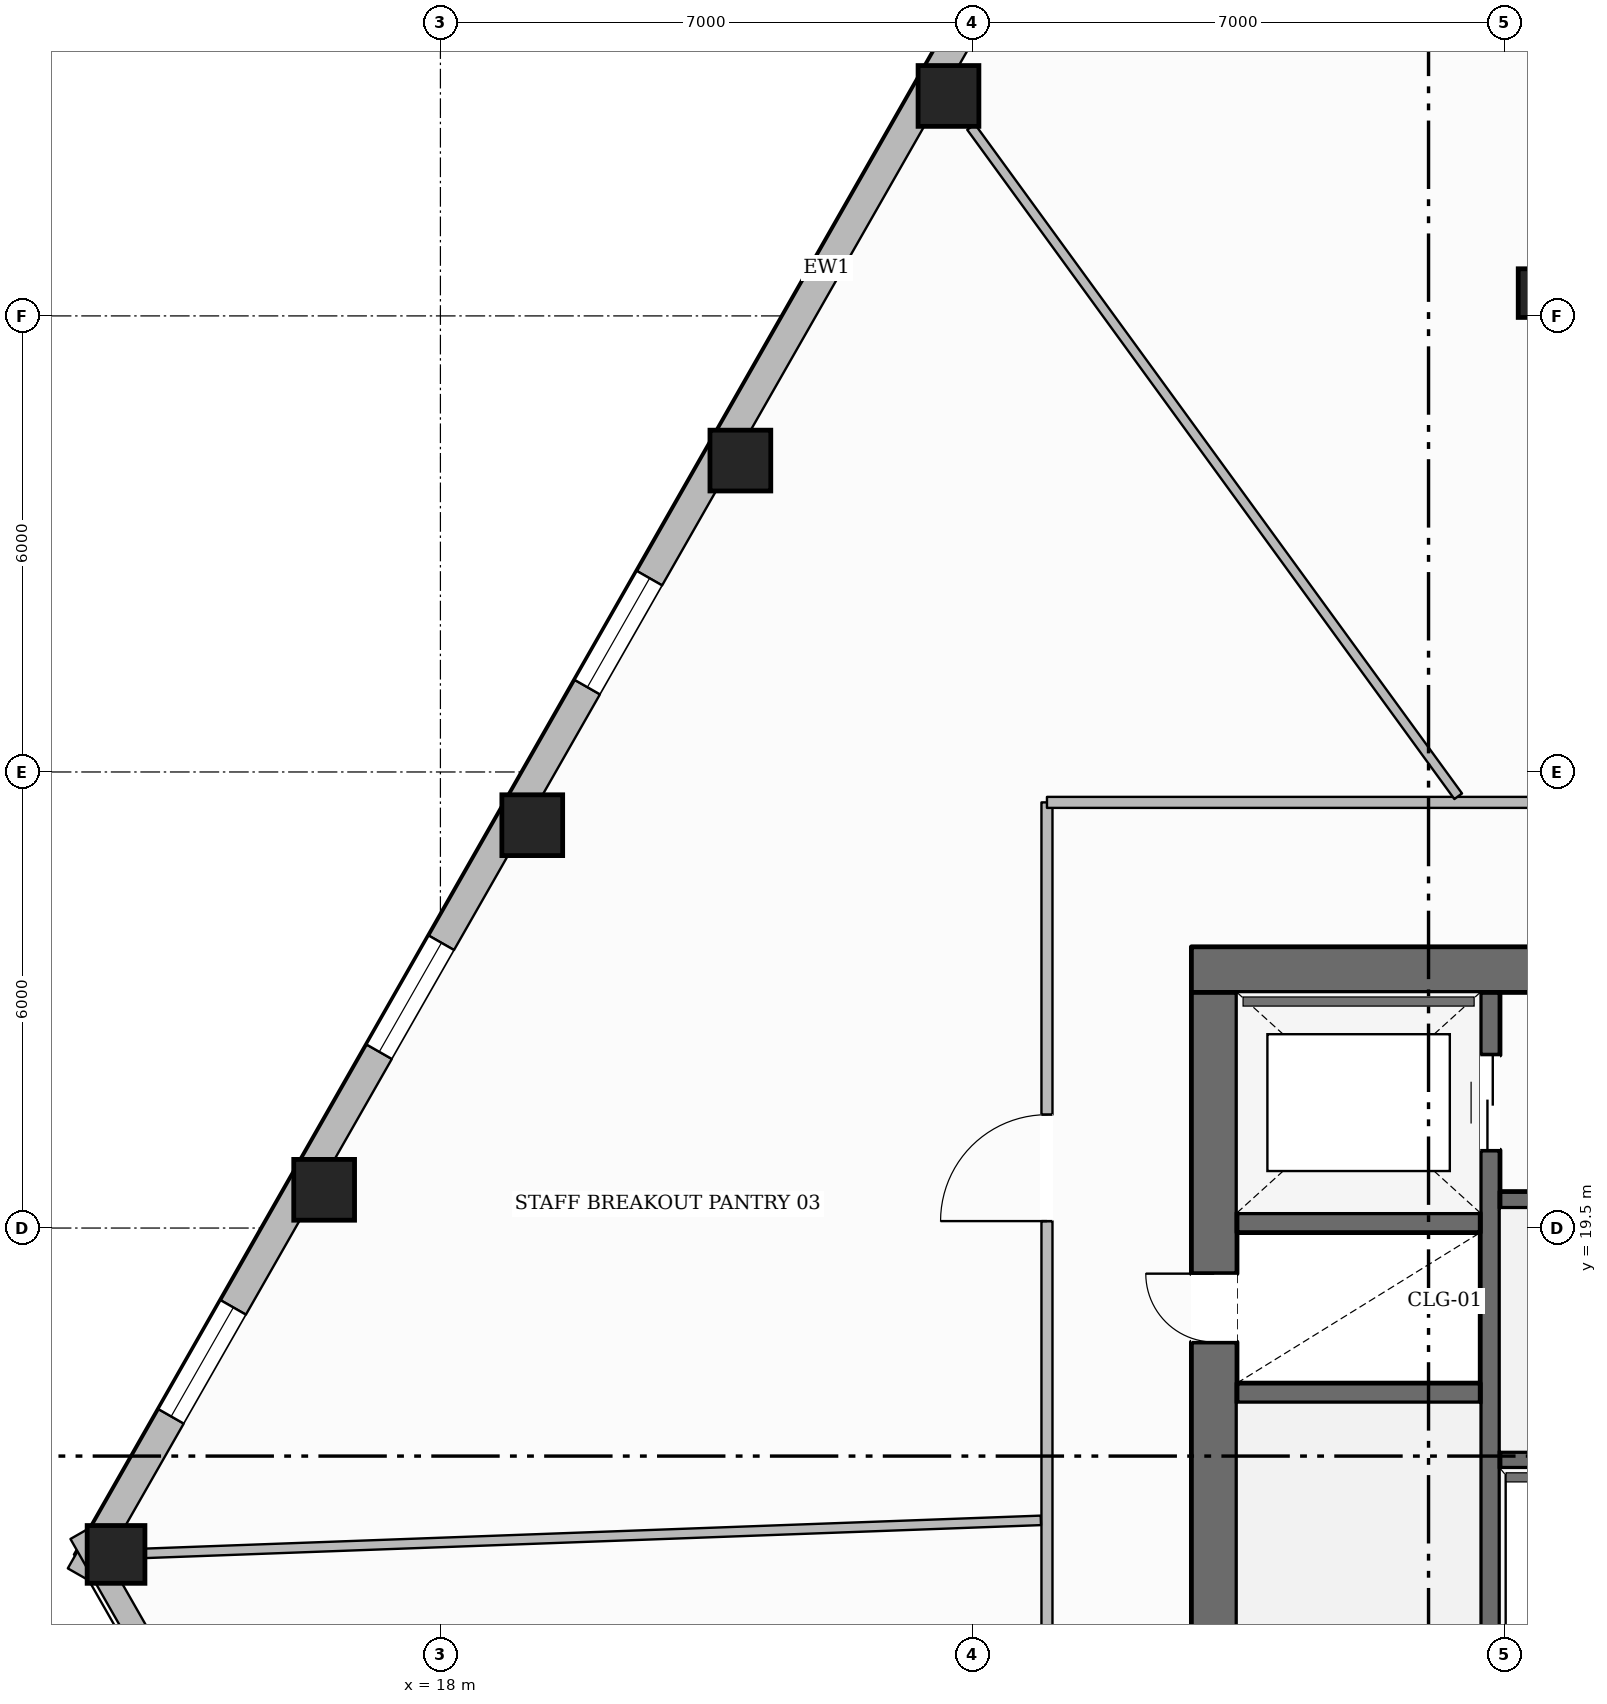
"""IFC4 building model, lengths in metres.
Left out: names, types, materials, properties, quantities, classifications, styles, units other than length and angle.
Written with IfcOpenShell. Run it as: python <this file> out.ifc"""

import sys

from ifc_helpers import new_model, si_unit, direction, frame, frame_2d, origin, origin_2d, place, context, subcontext, project, spatial, rectangle, hollow_rectangle, extrude, element, fill, save


model = new_model("IFC4")
c1 = context("Model", 3, precision=1e-05, world=origin(), true_north=direction((0.0, 1.0)))
c2 = subcontext(c1, "Body", "Model", "MODEL_VIEW")
j1 = project(units=[si_unit("LENGTHUNIT", "METRE"), si_unit("PLANEANGLEUNIT", "RADIAN")], contexts=[c1])
p1 = place(None, origin())
s1 = spatial("IfcSite", under=j1, at=p1, CompositionType="ELEMENT")
p2 = place(p1, origin())
s2 = spatial("IfcBuilding", under=s1, at=p2, CompositionType="ELEMENT")
p3 = place(p2, frame((0.0, 0.0, 21.4)))
s3 = spatial("IfcBuildingStorey", under=s2, at=p3, CompositionType="ELEMENT", Elevation=21.4)
p4 = place(p3, frame((27.88, 22.9, 0.0), z_axis=(0.0, 0.0, 1.0), x_axis=(1.0, 0.0, 0.0)))
e1 = element("IfcWall", 1, at=p4, inside=s3, PredefinedType="SOLIDWALL", context=c2, shape_type="SweptSolid", body=[
    extrude(rectangle(XDim=20.24, YDim=0.6, at=frame_2d((10.12, 0.0))), origin(), (0.0, 0.0, 1.0), 3.59),
])
p5 = place(p4, frame((6.395, 0.0, 0.0)))
e2 = element("IfcOpeningElement", 2, at=p5, cuts=e1, PredefinedType="OPENING", context=c2, shape_type="SweptSolid", body=[
    extrude(rectangle(XDim=1.05, YDim=2.15, at=frame_2d((0.525, 1.075))), frame((0.0, 0.31, 0.0), z_axis=(0.0, -1.0, 0.0), x_axis=(1.0, 0.0, 0.0)), (0.0, 0.0, 1.0), 0.62),
])
p6 = place(p4, frame((12.795, 0.0, 0.0)))
e3 = element("IfcOpeningElement", 3, at=p6, cuts=e1, PredefinedType="OPENING", context=c2, shape_type="SweptSolid", body=[
    extrude(rectangle(XDim=1.05, YDim=2.15, at=frame_2d((0.525, 1.075))), frame((0.0, 0.31, 0.0), z_axis=(0.0, -1.0, 0.0), x_axis=(1.0, 0.0, 0.0)), (0.0, 0.0, 1.0), 0.62),
])
p7 = place(p3, frame((28.18, 9.6, 0.0), z_axis=(0.0, 0.0, 1.0), x_axis=(0.0, 1.0, 0.0)))
e4 = element("IfcWall", 4, at=p7, inside=s3, PredefinedType="SOLIDWALL", context=c2, shape_type="SweptSolid", body=[
    extrude(rectangle(XDim=13.0, YDim=0.6, at=frame_2d((6.5, 0.0))), origin(), (0.0, 0.0, 1.0), 3.59),
])
p8 = place(p7, frame((0.2, 0.0, 0.0)))
e5 = element("IfcOpeningElement", 5, at=p8, cuts=e4, PredefinedType="OPENING", context=c2, shape_type="SweptSolid", body=[
    extrude(rectangle(XDim=1.1, YDim=2.15, at=frame_2d((0.55, 1.075))), frame((0.0, 0.31, 0.0), z_axis=(0.0, -1.0, 0.0), x_axis=(1.0, 0.0, 0.0)), (0.0, 0.0, 1.0), 0.62),
])
p9 = place(p7, frame((8.4, 0.0, 0.0)))
e6 = element("IfcOpeningElement", 6, at=p9, cuts=e4, PredefinedType="OPENING", context=c2, shape_type="SweptSolid", body=[
    extrude(rectangle(XDim=0.9, YDim=2.1, at=frame_2d((0.45, 1.05))), frame((0.0, 0.31, 0.0), z_axis=(0.0, -1.0, 0.0), x_axis=(1.0, 0.0, 0.0)), (0.0, 0.0, 1.0), 0.62),
])
p10 = place(p3, frame((31.81, 9.6, 0.0), z_axis=(0.0, 0.0, 1.0), x_axis=(0.0, 1.0, 0.0)))
e7 = element("IfcWall", 7, at=p10, inside=s3, PredefinedType="SHEAR", context=c2, shape_type="SweptSolid", body=[
    extrude(rectangle(XDim=13.0, YDim=0.26, at=frame_2d((6.5, 0.0))), origin(), (0.0, 0.0, 1.0), 3.59),
])
p11 = place(p10, frame((10.925, 0.0, 0.0)))
e8 = element("IfcOpeningElement", 8, at=p11, cuts=e7, PredefinedType="OPENING", context=c2, shape_type="SweptSolid", body=[
    extrude(rectangle(XDim=1.25, YDim=2.25, at=frame_2d((0.625, 1.125))), frame((0.0, 0.14, 0.0), z_axis=(0.0, -1.0, 0.0), x_axis=(1.0, 0.0, 0.0)), (0.0, 0.0, 1.0), 0.28),
])
for number, where, z_axis, x_axis in (
    (9, (28.48, 17.33, 0.0), (0.0, 0.0, 1.0), (1.0, 0.0, 0.0)),
    (10, (28.48, 19.57, 0.0), (0.0, 0.0, 1.0), (1.0, 0.0, 0.0)),
):
    element("IfcWall", number, at=place(p3, frame(where, z_axis=z_axis, x_axis=x_axis)), inside=s3, PredefinedType="SHEAR", context=c2, shape_type="SweptSolid", body=[
        extrude(rectangle(XDim=3.2, YDim=0.26, at=frame_2d((1.6, 0.0))), origin(), (0.0, 0.0, 1.0), 3.59),
    ])
p12 = place(p3, frame((31.94, 19.87, 0.0), z_axis=(0.0, 0.0, 1.0), x_axis=(1.0, 0.0, 0.0)))
e11 = element("IfcWall", 11, at=p12, inside=s3, PredefinedType="SOLIDWALL", context=c2, shape_type="SweptSolid", body=[
    extrude(rectangle(XDim=12.12, YDim=0.22, at=frame_2d((6.06, 0.0))), origin(), (0.0, 0.0, 1.0), 3.59),
])
p13 = place(p12, frame((6.3, 0.0, 0.0)))
e12 = element("IfcOpeningElement", 12, at=p13, cuts=e11, PredefinedType="OPENING", context=c2, shape_type="SweptSolid", body=[
    extrude(rectangle(XDim=1.1, YDim=2.15, at=frame_2d((0.55, 1.075))), frame((0.0, 0.12, 0.0), z_axis=(0.0, -1.0, 0.0), x_axis=(1.0, 0.0, 0.0)), (0.0, 0.0, 1.0), 0.24),
])
p14 = place(p12, frame((9.51, 0.0, 0.0)))
e13 = element("IfcOpeningElement", 13, at=p14, cuts=e11, PredefinedType="OPENING", context=c2, shape_type="SweptSolid", body=[
    extrude(rectangle(XDim=0.9, YDim=2.1, at=frame_2d((0.45, 1.05))), frame((0.0, 0.12, 0.0), z_axis=(0.0, -1.0, 0.0), x_axis=(1.0, 0.0, 0.0)), (0.0, 0.0, 1.0), 0.24),
])
p15 = place(p3, frame((31.94, 16.45, 0.0), z_axis=(0.0, 0.0, 1.0), x_axis=(1.0, 0.0, 0.0)))
e14 = element("IfcWall", 14, at=p15, inside=s3, PredefinedType="SOLIDWALL", context=c2, shape_type="SweptSolid", body=[
    extrude(rectangle(XDim=12.12, YDim=0.22, at=frame_2d((6.06, 0.0))), origin(), (0.0, 0.0, 1.0), 3.59),
])
for number, where, z_axis, x_axis in (
    (15, (24.684, 34.394, 0.0), (0.0, 0.0, 1.0), (1.0, 0.0, 0.0)),
    (16, (21.946, 29.597, 0.0), (0.0, 0.0, 1.0), (1.0, 0.0, 0.0)),
    (17, (19.208, 24.8, 0.0), (0.0, 0.0, 1.0), (1.0, 0.0, 0.0)),
    (18, (16.47, 20.003, 0.0), (0.0, 0.0, 1.0), (1.0, 0.0, 0.0)),
):
    element("IfcColumn", number, at=place(p3, frame(where, z_axis=z_axis, x_axis=x_axis)), inside=s3, PredefinedType="COLUMN", context=c2, shape_type="SweptSolid", body=[
        extrude(hollow_rectangle(XDim=0.8, YDim=0.8, WallThickness=0.036, at=origin_2d()), origin(), (0.0, 0.0, 1.0), 3.59),
    ])
p16 = place(p3, frame((13.733, 15.206, 0.0), z_axis=(0.0, 0.0, 1.0), x_axis=(1.0, 0.0, 0.0)))
e19 = element("IfcColumn", 19, at=p16, inside=s3, PredefinedType="COLUMN", context=c2, shape_type="SweptSolid", body=[
    extrude(hollow_rectangle(XDim=0.76, YDim=0.76, WallThickness=0.035, at=origin_2d()), origin(), (0.0, 0.0, 1.0), 3.59),
])
p17 = place(p3, frame((32.5, 31.8, 0.0), z_axis=(0.0, 0.0, 1.0), x_axis=(1.0, 0.0, 0.0)))
e20 = element("IfcColumn", 20, at=p17, inside=s3, PredefinedType="COLUMN", context=c2, shape_type="SweptSolid", body=[
    extrude(hollow_rectangle(XDim=0.64, YDim=0.64, WallThickness=0.028, at=origin_2d()), origin(), (0.0, 0.0, 1.0), 3.59),
])
p18 = place(p3, frame((13.263, 14.928, 0.0), z_axis=(0.0, 0.0, 1.0), x_axis=(0.495711630902, 0.868487178367, 0.0)))
e21 = element("IfcWall", 21, at=p18, inside=s3, PredefinedType="STANDARD", context=c2, shape_type="SweptSolid", body=[
    extrude(rectangle(XDim=34.092, YDim=0.38, at=frame_2d((17.046, 0.0))), origin(), (0.0, 0.0, 1.0), 2.97),
])
p19 = place(p18, frame((30.027, 0.0, 0.65)))
e22 = element("IfcOpeningElement", 22, at=p19, cuts=e21, PredefinedType="OPENING", context=c2, shape_type="SweptSolid", body=[
    extrude(rectangle(XDim=1.65, YDim=1.75, at=frame_2d((0.825, 0.875))), frame((0.0, 0.2, 0.0), z_axis=(0.0, -1.0, 0.0), x_axis=(1.0, 0.0, 0.0)), (0.0, 0.0, 1.0), 0.4),
])
p20 = place(p18, frame((24.504, 0.0, 0.65)))
e23 = element("IfcOpeningElement", 23, at=p20, cuts=e21, PredefinedType="OPENING", context=c2, shape_type="SweptSolid", body=[
    extrude(rectangle(XDim=1.65, YDim=1.75, at=frame_2d((0.825, 0.875))), frame((0.0, 0.2, 0.0), z_axis=(0.0, -1.0, 0.0), x_axis=(1.0, 0.0, 0.0)), (0.0, 0.0, 1.0), 0.4),
])
p21 = place(p18, frame((13.457, 0.0, 0.65)))
e24 = element("IfcOpeningElement", 24, at=p21, cuts=e21, PredefinedType="OPENING", context=c2, shape_type="SweptSolid", body=[
    extrude(rectangle(XDim=1.65, YDim=1.75, at=frame_2d((0.825, 0.875))), frame((0.0, 0.2, 0.0), z_axis=(0.0, -1.0, 0.0), x_axis=(1.0, 0.0, 0.0)), (0.0, 0.0, 1.0), 0.4),
])
p22 = place(p18, frame((7.934, 0.0, 0.65)))
e25 = element("IfcOpeningElement", 25, at=p22, cuts=e21, PredefinedType="OPENING", context=c2, shape_type="SweptSolid", body=[
    extrude(rectangle(XDim=1.65, YDim=1.75, at=frame_2d((0.825, 0.875))), frame((0.0, 0.2, 0.0), z_axis=(0.0, -1.0, 0.0), x_axis=(1.0, 0.0, 0.0)), (0.0, 0.0, 1.0), 0.4),
])
p23 = place(p18, frame((2.411, 0.0, 0.65)))
e26 = element("IfcOpeningElement", 26, at=p23, cuts=e21, PredefinedType="OPENING", context=c2, shape_type="SweptSolid", body=[
    extrude(rectangle(XDim=1.65, YDim=1.75, at=frame_2d((0.825, 0.875))), frame((0.0, 0.2, 0.0), z_axis=(0.0, -1.0, 0.0), x_axis=(1.0, 0.0, 0.0)), (0.0, 0.0, 1.0), 0.4),
])
p24 = place(p3, frame((21.58, 0.913, 0.0), z_axis=(0.0, 0.0, 1.0), x_axis=(-0.495706340457, 0.868490198005, 0.0)))
e27 = element("IfcWall", 27, at=p24, inside=s3, PredefinedType="STANDARD", context=c2, shape_type="SweptSolid", body=[
    extrude(rectangle(XDim=16.777, YDim=0.3, at=frame_2d((8.388, 0.0))), origin(), (0.0, 0.0, 1.0), 2.97),
])
p25 = place(p24, frame((7.789, 0.0, 0.65)))
e28 = element("IfcOpeningElement", 28, at=p25, cuts=e27, PredefinedType="OPENING", context=c2, shape_type="SweptSolid", body=[
    extrude(rectangle(XDim=1.2, YDim=1.7, at=frame_2d((0.6, 0.85))), frame((0.0, 0.16, 0.0), z_axis=(0.0, -1.0, 0.0), x_axis=(1.0, 0.0, 0.0)), (0.0, 0.0, 1.0), 0.32),
])
p26 = place(p3, frame((25.98, 9.1, 0.0), z_axis=(0.0, 0.0, 1.0), x_axis=(0.0, 1.0, 0.0)))
e29 = element("IfcWall", 29, at=p26, inside=s3, PredefinedType="PARTITIONING", context=c2, shape_type="SweptSolid", body=[
    extrude(rectangle(XDim=16.0, YDim=0.145, at=frame_2d((8.0, 0.0))), origin(), (0.0, 0.0, 1.0), 3.278),
])
p27 = place(p26, frame((10.491, 0.0, 0.0)))
e30 = element("IfcOpeningElement", 30, at=p27, cuts=e29, PredefinedType="OPENING", context=c2, shape_type="SweptSolid", body=[
    extrude(rectangle(XDim=1.4, YDim=2.2, at=frame_2d((0.7, 1.1))), frame((0.0, 0.083, 0.0), z_axis=(0.0, -1.0, 0.0), x_axis=(1.0, 0.0, 0.0)), (0.0, 0.0, 1.0), 0.165),
])
p28 = place(p26, frame((2.663, 0.0, 0.0)))
e31 = element("IfcOpeningElement", 31, at=p28, cuts=e29, PredefinedType="OPENING", context=c2, shape_type="SweptSolid", body=[
    extrude(rectangle(XDim=1.4, YDim=2.2, at=frame_2d((0.7, 1.1))), frame((0.0, 0.083, 0.0), z_axis=(0.0, -1.0, 0.0), x_axis=(1.0, 0.0, 0.0)), (0.0, 0.0, 1.0), 0.165),
])
p29 = place(p3, frame((25.98, 25.1, 0.0), z_axis=(0.0, 0.0, 1.0), x_axis=(1.0, 0.0, 0.0)))
e32 = element("IfcWall", 32, at=p29, inside=s3, PredefinedType="PARTITIONING", context=c2, shape_type="SweptSolid", body=[
    extrude(rectangle(XDim=11.02, YDim=0.145, at=frame_2d((5.51, 0.0))), origin(), (0.0, 0.0, 1.0), 3.59),
])
p30 = place(p3, frame((31.39, 25.18, 0.0), z_axis=(0.0, 0.0, 1.0), x_axis=(-0.588482227792, 0.808510153043, 0.0)))
e33 = element("IfcWall", 33, at=p30, inside=s3, PredefinedType="PARTITIONING", context=c2, shape_type="SweptSolid", body=[
    extrude(rectangle(XDim=10.891, YDim=0.125, at=frame_2d((5.445, 0.0))), origin(), (0.0, 0.0, 1.0), 3.057),
])
p31 = place(p3, frame((25.899, 15.654, 0.0), z_axis=(0.0, 0.0, 1.0), x_axis=(-0.999322388706, -0.036807111154, 0.0)))
e34 = element("IfcWall", 34, at=p31, inside=s3, PredefinedType="PARTITIONING", context=c2, shape_type="SweptSolid", body=[
    extrude(rectangle(XDim=11.787, YDim=0.125, at=frame_2d((5.894, 0.0))), origin(), (0.0, 0.0, 1.0), 3.057),
])
p32 = place(p21, origin())
e35 = element("IfcWindow", 35, at=p32, inside=s3, PartitioningType="SINGLE_PANEL", PredefinedType="WINDOW", context=c2, shape_type="SweptSolid", body=[
    extrude(rectangle(XDim=1.65, YDim=1.75, at=frame_2d((0.825, 0.875))), frame((0.0, 0.03, 0.0), z_axis=(0.0, -1.0, 0.0), x_axis=(1.0, 0.0, 0.0)), (0.0, 0.0, 1.0), 0.06),
])
fill(e24, e35)
p33 = place(p22, origin())
e36 = element("IfcWindow", 36, at=p33, inside=s3, PartitioningType="SINGLE_PANEL", PredefinedType="WINDOW", context=c2, shape_type="SweptSolid", body=[
    extrude(rectangle(XDim=1.65, YDim=1.75, at=frame_2d((0.825, 0.875))), frame((0.0, 0.03, 0.0), z_axis=(0.0, -1.0, 0.0), x_axis=(1.0, 0.0, 0.0)), (0.0, 0.0, 1.0), 0.06),
])
fill(e25, e36)
p34 = place(p23, origin())
e37 = element("IfcWindow", 37, at=p34, inside=s3, PartitioningType="SINGLE_PANEL", PredefinedType="WINDOW", context=c2, shape_type="SweptSolid", body=[
    extrude(rectangle(XDim=1.65, YDim=1.75, at=frame_2d((0.825, 0.875))), frame((0.0, 0.03, 0.0), z_axis=(0.0, -1.0, 0.0), x_axis=(1.0, 0.0, 0.0)), (0.0, 0.0, 1.0), 0.06),
])
fill(e26, e37)
p35 = place(p9, origin())
e38 = element("IfcDoor", 38, at=p35, inside=s3, OperationType="SINGLE_SWING_RIGHT", PredefinedType="DOOR", context=c2, shape_type="SweptSolid", body=[
    extrude(rectangle(XDim=0.9, YDim=2.1, at=frame_2d((0.45, 1.05))), frame((0.0, 0.025, 0.0), z_axis=(0.0, -1.0, 0.0), x_axis=(1.0, 0.0, 0.0)), (0.0, 0.0, 1.0), 0.05),
])
fill(e6, e38)
p36 = place(p11, origin())
e39 = element("IfcDoor", 39, at=p36, inside=s3, OperationType="DOUBLE_DOOR_SLIDING", PredefinedType="DOOR", context=c2, shape_type="SweptSolid", body=[
    extrude(rectangle(XDim=1.25, YDim=2.25, at=frame_2d((0.625, 1.125))), frame((0.0, 0.025, 0.0), z_axis=(0.0, -1.0, 0.0), x_axis=(1.0, 0.0, 0.0)), (0.0, 0.0, 1.0), 0.05),
])
fill(e8, e39)
p37 = place(p27, origin())
e40 = element("IfcDoor", 40, at=p37, inside=s3, OperationType="SINGLE_SWING_LEFT", PredefinedType="DOOR", context=c2, shape_type="SweptSolid", body=[
    extrude(rectangle(XDim=1.4, YDim=2.2, at=frame_2d((0.7, 1.1))), frame((0.0, 0.025, 0.0), z_axis=(0.0, -1.0, 0.0), x_axis=(1.0, 0.0, 0.0)), (0.0, 0.0, 1.0), 0.05),
])
fill(e30, e40)
save(model, sys.argv[1])
